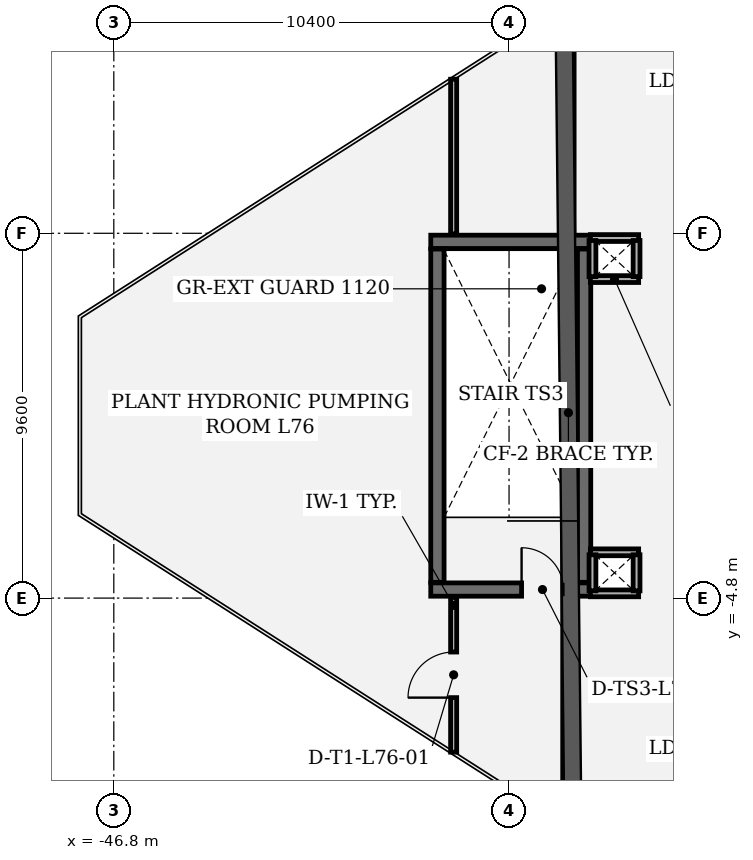
"""IFC4 building model, lengths in metres.
Left out: names, types, materials, properties, quantities, classifications, styles, units other than length and angle.
Written with IfcOpenShell. Run it as: python <this file> out.ifc"""

import sys

from ifc_helpers import new_model, si_unit, direction, frame, frame_2d, origin, place, context, subcontext, project, spatial, rectangle, extrude, element, fill, save


model = new_model("IFC4")
c1 = context("Model", 3, precision=1e-05, world=origin(), true_north=direction((0.0, 1.0)))
c2 = subcontext(c1, "Body", "Model", "MODEL_VIEW")
j1 = project(units=[si_unit("LENGTHUNIT", "METRE"), si_unit("PLANEANGLEUNIT", "RADIAN")], contexts=[c1])
p1 = place(None, origin())
s1 = spatial("IfcSite", under=j1, at=p1, CompositionType="ELEMENT")
p2 = place(p1, origin())
s2 = spatial("IfcBuilding", under=s1, at=p2, CompositionType="ELEMENT")
p3 = place(p2, frame((0.0, 0.0, 327.0)))
s3 = spatial("IfcBuildingStorey", under=s2, at=p3, CompositionType="ELEMENT", Elevation=327.0)
p4 = place(p3, frame((-38.46, -4.575, 0.0), z_axis=(0.0, 0.0, 1.0), x_axis=(1.0, 0.0, 0.0)))
e1 = element("IfcWall", 1, at=p4, inside=s3, PredefinedType="SHEAR", context=c2, shape_type="SweptSolid", body=[
    extrude(rectangle(XDim=4.21, YDim=0.35, at=frame_2d((2.105, 0.0))), origin(), (0.0, 0.0, 1.0), 3.92),
])
p5 = place(p4, frame((2.39, 0.0, 0.0)))
e2 = element("IfcOpeningElement", 2, at=p5, cuts=e1, PredefinedType="OPENING", context=c2, shape_type="SweptSolid", body=[
    extrude(rectangle(XDim=1.1, YDim=2.2, at=frame_2d((0.55, 1.1))), frame((0.0, 0.185, 0.0), z_axis=(0.0, -1.0, 0.0), x_axis=(1.0, 0.0, 0.0)), (0.0, 0.0, 1.0), 0.37),
])
p6 = place(p3, frame((-34.25, 4.575, 0.0), z_axis=(0.0, 0.0, 1.0), x_axis=(-1.0, 0.0, 0.0)))
e3 = element("IfcWall", 3, at=p6, inside=s3, PredefinedType="SHEAR", context=c2, shape_type="SweptSolid", body=[
    extrude(rectangle(XDim=4.21, YDim=0.35, at=frame_2d((2.105, 0.0))), origin(), (0.0, 0.0, 1.0), 3.92),
])
for number, where, z_axis, x_axis in (
    (4, (-34.425, -4.385, 0.0), (0.0, 0.0, 1.0), (0.0, 1.0, 0.0)),
    (5, (-38.285, 4.385, 0.0), (0.0, 0.0, 1.0), (0.0, -1.0, 0.0)),
):
    element("IfcWall", number, at=place(p3, frame(where, z_axis=z_axis, x_axis=x_axis)), inside=s3, PredefinedType="SHEAR", context=c2, shape_type="SweptSolid", body=[
        extrude(rectangle(XDim=8.77, YDim=0.35, at=frame_2d((4.385, 0.0))), origin(), (0.0, 0.0, 1.0), 3.92),
    ])
for number, where, z_axis, x_axis in (
    (6, (-32.99, 3.595, 0.0), (0.0, 0.0, 1.0), (-1.0, 0.0, 0.0)),
    (7, (-34.26, 4.675, 0.0), (0.0, 0.0, 1.0), (1.0, 0.0, 0.0)),
):
    element("IfcWall", number, at=place(p3, frame(where, z_axis=z_axis, x_axis=x_axis)), inside=s3, PredefinedType="PARTITIONING", context=c2, shape_type="SweptSolid", body=[
        extrude(rectangle(XDim=1.27, YDim=0.18, at=frame_2d((0.635, 0.0))), origin(), (0.0, 0.0, 1.0), 3.92),
    ])
for number, where, z_axis, x_axis in (
    (8, (-34.205, 3.66, 0.0), (0.0, 0.0, 1.0), (0.0, 1.0, 0.0)),
    (9, (-33.045, 4.61, 0.0), (0.0, 0.0, 1.0), (0.0, -1.0, 0.0)),
):
    element("IfcWall", number, at=place(p3, frame(where, z_axis=z_axis, x_axis=x_axis)), inside=s3, PredefinedType="PARTITIONING", context=c2, shape_type="SweptSolid", body=[
        extrude(rectangle(XDim=0.95, YDim=0.18, at=frame_2d((0.475, 0.0))), origin(), (0.0, 0.0, 1.0), 3.92),
    ])
for number, where, z_axis, x_axis in (
    (10, (-32.99, -4.675, 0.0), (0.0, 0.0, 1.0), (-1.0, 0.0, 0.0)),
    (11, (-34.26, -3.595, 0.0), (0.0, 0.0, 1.0), (1.0, 0.0, 0.0)),
):
    element("IfcWall", number, at=place(p3, frame(where, z_axis=z_axis, x_axis=x_axis)), inside=s3, PredefinedType="PARTITIONING", context=c2, shape_type="SweptSolid", body=[
        extrude(rectangle(XDim=1.27, YDim=0.18, at=frame_2d((0.635, 0.0))), origin(), (0.0, 0.0, 1.0), 3.92),
    ])
for number, where, z_axis, x_axis in (
    (12, (-34.205, -4.61, 0.0), (0.0, 0.0, 1.0), (0.0, 1.0, 0.0)),
    (13, (-33.045, -3.66, 0.0), (0.0, 0.0, 1.0), (0.0, -1.0, 0.0)),
):
    element("IfcWall", number, at=place(p3, frame(where, z_axis=z_axis, x_axis=x_axis)), inside=s3, PredefinedType="PARTITIONING", context=c2, shape_type="SweptSolid", body=[
        extrude(rectangle(XDim=0.95, YDim=0.18, at=frame_2d((0.475, 0.0))), origin(), (0.0, 0.0, 1.0), 3.92),
    ])
p7 = place(p3, frame((-37.858, -8.854, 0.0), z_axis=(0.0, 0.0, 1.0), x_axis=(0.0, 1.0, 0.0)))
e14 = element("IfcWall", 14, at=p7, inside=s3, PredefinedType="PARTITIONING", context=c2, shape_type="SweptSolid", body=[
    extrude(rectangle(XDim=4.071, YDim=0.16, at=frame_2d((2.036, 0.0))), origin(), (0.0, 0.0, 1.0), 3.92),
])
p8 = place(p7, frame((1.436, 0.0, 0.0)))
e15 = element("IfcOpeningElement", 15, at=p8, cuts=e14, PredefinedType="OPENING", context=c2, shape_type="SweptSolid", body=[
    extrude(rectangle(XDim=1.2, YDim=2.15, at=frame_2d((0.6, 1.075))), frame((0.0, 0.09, 0.0), z_axis=(0.0, -1.0, 0.0), x_axis=(1.0, 0.0, 0.0)), (0.0, 0.0, 1.0), 0.18),
])
p9 = place(p3, frame((-37.858, 4.783, 0.0), z_axis=(0.0, 0.0, 1.0), x_axis=(0.0, 1.0, 0.0)))
e16 = element("IfcWall", 16, at=p9, inside=s3, PredefinedType="PARTITIONING", context=c2, shape_type="SweptSolid", body=[
    extrude(rectangle(XDim=4.071, YDim=0.16, at=frame_2d((2.036, 0.0))), origin(), (0.0, 0.0, 1.0), 3.92),
])
p10 = place(p5, origin())
e17 = element("IfcDoor", 17, at=p10, inside=s3, OperationType="SINGLE_SWING_LEFT", PredefinedType="DOOR", context=c2, shape_type="SweptSolid", body=[
    extrude(rectangle(XDim=1.1, YDim=2.2, at=frame_2d((0.55, 1.1))), frame((0.0, 0.025, 0.0), z_axis=(0.0, -1.0, 0.0), x_axis=(1.0, 0.0, 0.0)), (0.0, 0.0, 1.0), 0.05),
])
fill(e2, e17)
p11 = place(p8, origin())
e18 = element("IfcDoor", 18, at=p11, inside=s3, OperationType="SINGLE_SWING_LEFT", PredefinedType="DOOR", context=c2, shape_type="SweptSolid", body=[
    extrude(rectangle(XDim=1.2, YDim=2.15, at=frame_2d((0.6, 1.075))), frame((0.0, 0.025, 0.0), z_axis=(0.0, -1.0, 0.0), x_axis=(1.0, 0.0, 0.0)), (0.0, 0.0, 1.0), 0.05),
])
fill(e15, e18)
save(model, sys.argv[1])
